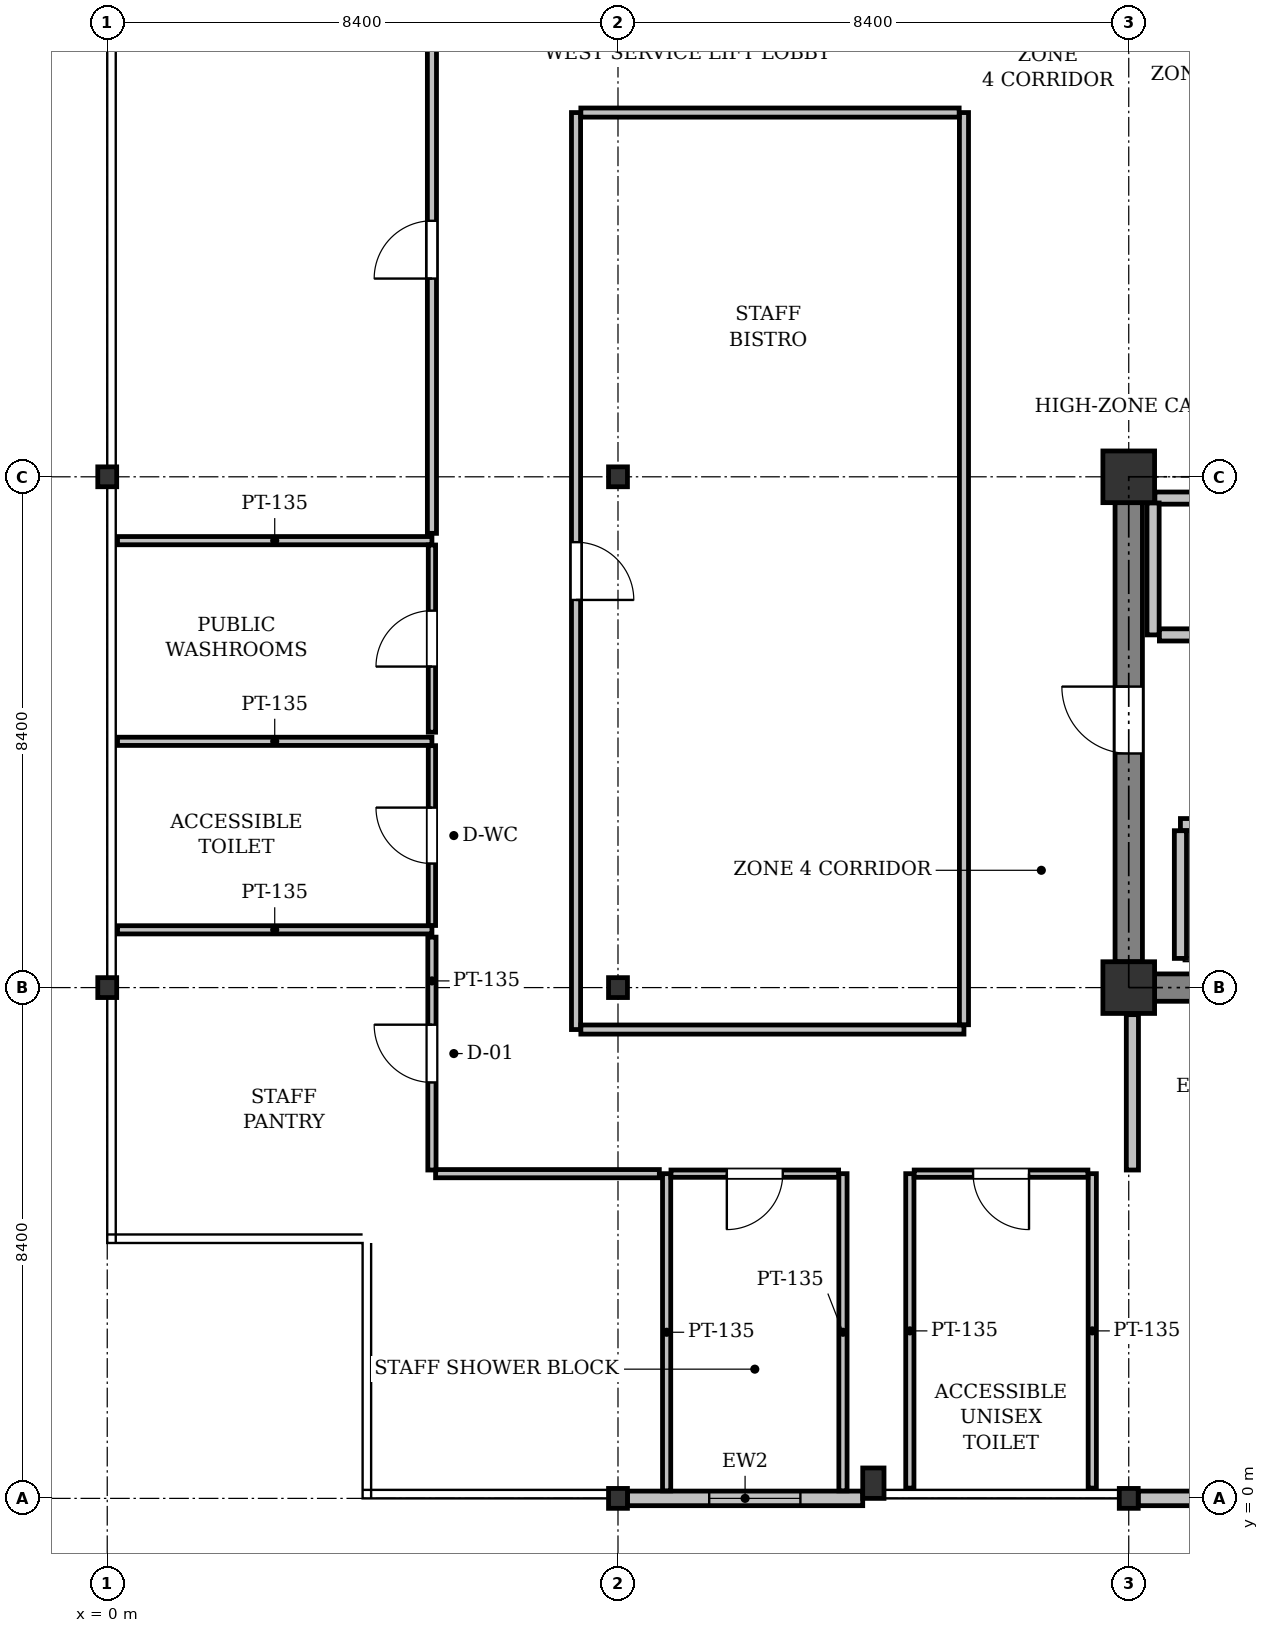
"""IFC4 building model, lengths in metres.
Left out: names, types, materials, properties, quantities, classifications, styles, units other than length and angle.
Written with IfcOpenShell. Run it as: python <this file> out.ifc"""

import sys

from ifc_helpers import new_model, si_unit, direction, frame, frame_2d, origin, origin_2d, place, context, subcontext, project, spatial, rectangle, i_section, extrude, element, fill, save


model = new_model("IFC4")
c1 = context("Model", 3, precision=1e-05, world=origin(), true_north=direction((0.0, 1.0)))
c2 = subcontext(c1, "Body", "Model", "MODEL_VIEW")
j1 = project(units=[si_unit("LENGTHUNIT", "METRE"), si_unit("PLANEANGLEUNIT", "RADIAN")], contexts=[c1])
p1 = place(None, origin())
s1 = spatial("IfcSite", under=j1, at=p1, CompositionType="ELEMENT")
p2 = place(p1, origin())
s2 = spatial("IfcBuilding", under=s1, at=p2, CompositionType="ELEMENT")
p3 = place(p2, frame((0.0, 0.0, 274.2)))
s3 = spatial("IfcBuildingStorey", under=s2, at=p3, CompositionType="ELEMENT", Elevation=274.2)
for number, where, z_axis, x_axis in (
    (1, (0.0, 8.4, 0.0), (0.0, 0.0, 1.0), (1.0, 0.0, 0.0)),
    (2, (0.0, 16.8, 0.0), (0.0, 0.0, 1.0), (1.0, 0.0, 0.0)),
    (3, (8.4, 0.0, 0.0), (0.0, 0.0, 1.0), (1.0, 0.0, 0.0)),
    (4, (8.4, 8.4, 0.0), (0.0, 0.0, 1.0), (1.0, 0.0, 0.0)),
    (5, (8.4, 16.8, 0.0), (0.0, 0.0, 1.0), (1.0, 0.0, 0.0)),
    (6, (16.8, 0.0, 0.0), (0.0, 0.0, 1.0), (1.0, 0.0, 0.0)),
):
    element("IfcColumn", number, at=place(p3, frame(where, z_axis=z_axis, x_axis=x_axis)), inside=s3, PredefinedType="COLUMN", context=c2, shape_type="SweptSolid", body=[
        extrude(i_section(OverallWidth=0.311, OverallDepth=0.327, WebThickness=0.016, FlangeThickness=0.025, FilletRadius=0.017, at=origin_2d()), origin(), (0.0, 0.0, 1.0), 4.0),
    ])
for number, where, z_axis, x_axis in (
    (7, (16.8, 8.4, 0.0), (0.0, 0.0, 1.0), (1.0, 0.0, 0.0)),
    (8, (16.8, 16.8, 0.0), (0.0, 0.0, 1.0), (1.0, 0.0, 0.0)),
):
    element("IfcColumn", number, at=place(p3, frame(where, z_axis=z_axis, x_axis=x_axis)), inside=s3, PredefinedType="COLUMN", context=c2, shape_type="SweptSolid", body=[
        extrude(rectangle(XDim=0.85, YDim=0.85, at=origin_2d()), origin(), (0.0, 0.0, 1.0), 4.0),
    ])
p4 = place(p3, frame((12.6, 0.25, 0.0), z_axis=(0.0, 0.0, 1.0), x_axis=(1.0, 0.0, 0.0)))
e9 = element("IfcColumn", 9, at=p4, inside=s3, PredefinedType="PILASTER", context=c2, shape_type="SweptSolid", body=[
    extrude(rectangle(XDim=0.35, YDim=0.5, at=origin_2d()), origin(), (0.0, 0.0, 1.0), 4.0),
])
p5 = place(p3, frame((20.825, 0.0, 0.0), z_axis=(0.0, 0.0, 1.0), x_axis=(-1.0, 0.0, 0.0)))
e10 = element("IfcWall", 10, at=p5, inside=s3, PredefinedType="STANDARD", context=c2, shape_type="SweptSolid", body=[
    extrude(rectangle(XDim=3.869, YDim=0.24, at=frame_2d((1.935, 0.0))), origin(), (0.0, 0.0, 1.0), 3.475),
])
p6 = place(p5, frame((1.185, 0.0, 0.9)))
e11 = element("IfcOpeningElement", 11, at=p6, cuts=e10, PredefinedType="OPENING", context=c2, shape_type="SweptSolid", body=[
    extrude(rectangle(XDim=1.5, YDim=1.6, at=frame_2d((0.75, 0.8))), frame((0.0, 0.13, 0.0), z_axis=(0.0, -1.0, 0.0), x_axis=(1.0, 0.0, 0.0)), (0.0, 0.0, 1.0), 0.26),
])
p7 = place(p3, frame((12.425, 0.0, 0.0), z_axis=(0.0, 0.0, 1.0), x_axis=(-1.0, 0.0, 0.0)))
e12 = element("IfcWall", 12, at=p7, inside=s3, PredefinedType="STANDARD", context=c2, shape_type="SweptSolid", body=[
    extrude(rectangle(XDim=3.87, YDim=0.24, at=frame_2d((1.935, 0.0))), origin(), (0.0, 0.0, 1.0), 3.475),
])
p8 = place(p7, frame((1.025, 0.0, 0.9)))
e13 = element("IfcOpeningElement", 13, at=p8, cuts=e12, PredefinedType="OPENING", context=c2, shape_type="SweptSolid", body=[
    extrude(rectangle(XDim=1.5, YDim=1.6, at=frame_2d((0.75, 0.8))), frame((0.0, 0.13, 0.0), z_axis=(0.0, -1.0, 0.0), x_axis=(1.0, 0.0, 0.0)), (0.0, 0.0, 1.0), 0.26),
])
p9 = place(p3, frame((17.225, 8.4, 0.0), z_axis=(0.0, 0.0, 1.0), x_axis=(1.0, 0.0, 0.0)))
e14 = element("IfcWall", 14, at=p9, inside=s3, PredefinedType="SHEAR", context=c2, shape_type="SweptSolid", body=[
    extrude(rectangle(XDim=7.55, YDim=0.45, at=frame_2d((3.775, 0.0))), origin(), (0.0, 0.0, 1.0), 3.725),
])
p10 = place(p3, frame((16.8, 8.825, 0.0), z_axis=(0.0, 0.0, 1.0), x_axis=(0.0, 1.0, 0.0)))
e15 = element("IfcWall", 15, at=p10, inside=s3, PredefinedType="SHEAR", context=c2, shape_type="SweptSolid", body=[
    extrude(rectangle(XDim=7.55, YDim=0.45, at=frame_2d((3.775, 0.0))), origin(), (0.0, 0.0, 1.0), 3.725),
])
p11 = place(p10, frame((3.425, 0.0, 0.0)))
e16 = element("IfcOpeningElement", 16, at=p11, cuts=e15, PredefinedType="OPENING", context=c2, shape_type="SweptSolid", body=[
    extrude(rectangle(XDim=1.1, YDim=2.15, at=frame_2d((0.55, 1.075))), frame((0.0, 0.235, 0.0), z_axis=(0.0, -1.0, 0.0), x_axis=(1.0, 0.0, 0.0)), (0.0, 0.0, 1.0), 0.47),
])
p12 = place(p3, frame((17.65, 11.08, 0.0), z_axis=(0.0, 0.0, 1.0), x_axis=(1.0, 0.0, 0.0)))
e17 = element("IfcWall", 17, at=p12, inside=s3, PredefinedType="PARTITIONING", context=c2, shape_type="SweptSolid", body=[
    extrude(rectangle(XDim=2.55, YDim=0.2, at=frame_2d((1.275, 0.0))), origin(), (0.0, 0.0, 1.0), 3.725),
])
p13 = place(p12, frame((0.725, 0.0, 0.0)))
e18 = element("IfcOpeningElement", 18, at=p13, cuts=e17, PredefinedType="OPENING", context=c2, shape_type="SweptSolid", body=[
    extrude(rectangle(XDim=1.1, YDim=2.2, at=frame_2d((0.55, 1.1))), frame((0.0, 0.11, 0.0), z_axis=(0.0, -1.0, 0.0), x_axis=(1.0, 0.0, 0.0)), (0.0, 0.0, 1.0), 0.22),
])
p14 = place(p3, frame((17.65, 8.88, 0.0), z_axis=(0.0, 0.0, 1.0), x_axis=(0.0, 1.0, 0.0)))
e19 = element("IfcWall", 19, at=p14, inside=s3, PredefinedType="PARTITIONING", context=c2, shape_type="SweptSolid", body=[
    extrude(rectangle(XDim=2.1, YDim=0.2, at=frame_2d((1.05, 0.0))), origin(), (0.0, 0.0, 1.0), 3.725),
])
p15 = place(p3, frame((21.446, 16.45, 0.0), z_axis=(0.0, 0.0, 1.0), x_axis=(-1.0, 0.0, 0.0)))
e20 = element("IfcWall", 20, at=p15, inside=s3, PredefinedType="PARTITIONING", context=c2, shape_type="SweptSolid", body=[
    extrude(rectangle(XDim=4.216, YDim=0.2, at=frame_2d((2.108, 0.0))), origin(), (0.0, 0.0, 1.0), 3.725),
])
p16 = place(p3, frame((17.2, 16.37, 0.0), z_axis=(0.0, 0.0, 1.0), x_axis=(0.0, -1.0, 0.0)))
e21 = element("IfcWall", 21, at=p16, inside=s3, PredefinedType="PARTITIONING", context=c2, shape_type="SweptSolid", body=[
    extrude(rectangle(XDim=2.17, YDim=0.2, at=frame_2d((1.085, 0.0))), origin(), (0.0, 0.0, 1.0), 3.725),
])
p17 = place(p3, frame((17.304, 14.2, 0.0), z_axis=(0.0, 0.0, 1.0), x_axis=(1.0, 0.0, 0.0)))
e22 = element("IfcWall", 22, at=p17, inside=s3, PredefinedType="PARTITIONING", context=c2, shape_type="SweptSolid", body=[
    extrude(rectangle(XDim=4.142, YDim=0.2, at=frame_2d((2.071, 0.0))), origin(), (0.0, 0.0, 1.0), 3.725),
])
p18 = place(p17, frame((1.646, 0.0, 0.0)))
e23 = element("IfcOpeningElement", 23, at=p18, cuts=e22, PredefinedType="OPENING", context=c2, shape_type="SweptSolid", body=[
    extrude(rectangle(XDim=0.85, YDim=2.15, at=frame_2d((0.425, 1.075))), frame((0.0, 0.11, 0.0), z_axis=(0.0, -1.0, 0.0), x_axis=(1.0, 0.0, 0.0)), (0.0, 0.0, 1.0), 0.22),
])
for number, where, z_axis, x_axis in (
    (24, (5.34, 12.45, 0.0), (0.0, 0.0, 1.0), (-1.0, 0.0, 0.0)),
    (25, (0.169, 9.35, 0.0), (0.0, 0.0, 1.0), (1.0, 0.0, 0.0)),
):
    element("IfcWall", number, at=place(p3, frame(where, z_axis=z_axis, x_axis=x_axis)), inside=s3, PredefinedType="PARTITIONING", context=c2, shape_type="SweptSolid", body=[
        extrude(rectangle(XDim=5.171, YDim=0.135, at=frame_2d((2.585, 0.0))), origin(), (0.0, 0.0, 1.0), 3.421),
    ])
p19 = place(p3, frame((5.34, 9.421, 0.0), z_axis=(0.0, 0.0, 1.0), x_axis=(0.0, 1.0, 0.0)))
e26 = element("IfcWall", 26, at=p19, inside=s3, PredefinedType="PARTITIONING", context=c2, shape_type="SweptSolid", body=[
    extrude(rectangle(XDim=2.957, YDim=0.12, at=frame_2d((1.479, 0.0))), origin(), (0.0, 0.0, 1.0), 3.725),
])
p20 = place(p19, frame((1.019, 0.0, 0.0)))
e27 = element("IfcOpeningElement", 27, at=p20, cuts=e26, PredefinedType="OPENING", context=c2, shape_type="SweptSolid", body=[
    extrude(rectangle(XDim=0.92, YDim=2.1, at=frame_2d((0.46, 1.05))), frame((0.0, 0.07, 0.0), z_axis=(0.0, -1.0, 0.0), x_axis=(1.0, 0.0, 0.0)), (0.0, 0.0, 1.0), 0.14),
])
p21 = place(p3, frame((5.34, 15.75, 0.0), z_axis=(0.0, 0.0, 1.0), x_axis=(-1.0, 0.0, 0.0)))
e28 = element("IfcWall", 28, at=p21, inside=s3, PredefinedType="PARTITIONING", context=c2, shape_type="SweptSolid", body=[
    extrude(rectangle(XDim=5.171, YDim=0.135, at=frame_2d((2.585, 0.0))), origin(), (0.0, 0.0, 1.0), 3.421),
])
p22 = place(p3, frame((5.34, 12.6, 0.0), z_axis=(0.0, 0.0, 1.0), x_axis=(0.0, 1.0, 0.0)))
e29 = element("IfcWall", 29, at=p22, inside=s3, PredefinedType="PARTITIONING", context=c2, shape_type="SweptSolid", body=[
    extrude(rectangle(XDim=3.078, YDim=0.12, at=frame_2d((1.539, 0.0))), origin(), (0.0, 0.0, 1.0), 3.725),
])
p23 = place(p22, frame((1.079, 0.0, 0.0)))
e30 = element("IfcOpeningElement", 30, at=p23, cuts=e29, PredefinedType="OPENING", context=c2, shape_type="SweptSolid", body=[
    extrude(rectangle(XDim=0.92, YDim=2.1, at=frame_2d((0.46, 1.05))), frame((0.0, 0.07, 0.0), z_axis=(0.0, -1.0, 0.0), x_axis=(1.0, 0.0, 0.0)), (0.0, 0.0, 1.0), 0.14),
])
for number, where, z_axis, x_axis in (
    (31, (9.2, 5.34, 0.0), (0.0, 0.0, 1.0), (0.0, -1.0, 0.0)),
    (32, (12.1, 0.124, 0.0), (0.0, 0.0, 1.0), (0.0, 1.0, 0.0)),
):
    element("IfcWall", number, at=place(p3, frame(where, z_axis=z_axis, x_axis=x_axis)), inside=s3, PredefinedType="PARTITIONING", context=c2, shape_type="SweptSolid", body=[
        extrude(rectangle(XDim=5.216, YDim=0.135, at=frame_2d((2.608, 0.0))), origin(), (0.0, 0.0, 1.0), 3.725),
    ])
p24 = place(p3, frame((12.029, 5.34, 0.0), z_axis=(0.0, 0.0, 1.0), x_axis=(-1.0, 0.0, 0.0)))
e33 = element("IfcWall", 33, at=p24, inside=s3, PredefinedType="PARTITIONING", context=c2, shape_type="SweptSolid", body=[
    extrude(rectangle(XDim=2.757, YDim=0.12, at=frame_2d((1.378, 0.0))), origin(), (0.0, 0.0, 1.0), 3.725),
])
p25 = place(p24, frame((0.918, 0.0, 0.0)))
e34 = element("IfcOpeningElement", 34, at=p25, cuts=e33, PredefinedType="OPENING", context=c2, shape_type="SweptSolid", body=[
    extrude(rectangle(XDim=0.92, YDim=2.1, at=frame_2d((0.46, 1.05))), frame((0.0, 0.07, 0.0), z_axis=(0.0, -1.0, 0.0), x_axis=(1.0, 0.0, 0.0)), (0.0, 0.0, 1.0), 0.14),
])
for number, where, z_axis, x_axis in (
    (35, (13.2, 5.34, 0.0), (0.0, 0.0, 1.0), (0.0, -1.0, 0.0)),
    (36, (16.2, 0.169, 0.0), (0.0, 0.0, 1.0), (0.0, 1.0, 0.0)),
):
    element("IfcWall", number, at=place(p3, frame(where, z_axis=z_axis, x_axis=x_axis)), inside=s3, PredefinedType="PARTITIONING", context=c2, shape_type="SweptSolid", body=[
        extrude(rectangle(XDim=5.171, YDim=0.135, at=frame_2d((2.585, 0.0))), origin(), (0.0, 0.0, 1.0), 3.725),
    ])
p26 = place(p3, frame((16.128, 5.34, 0.0), z_axis=(0.0, 0.0, 1.0), x_axis=(-1.0, 0.0, 0.0)))
e37 = element("IfcWall", 37, at=p26, inside=s3, PredefinedType="PARTITIONING", context=c2, shape_type="SweptSolid", body=[
    extrude(rectangle(XDim=2.857, YDim=0.12, at=frame_2d((1.428, 0.0))), origin(), (0.0, 0.0, 1.0), 3.725),
])
p27 = place(p26, frame((0.969, 0.0, 0.0)))
e38 = element("IfcOpeningElement", 38, at=p27, cuts=e37, PredefinedType="OPENING", context=c2, shape_type="SweptSolid", body=[
    extrude(rectangle(XDim=0.92, YDim=2.1, at=frame_2d((0.46, 1.05))), frame((0.0, 0.07, 0.0), z_axis=(0.0, -1.0, 0.0), x_axis=(1.0, 0.0, 0.0)), (0.0, 0.0, 1.0), 0.14),
])
p28 = place(p3, frame((9.08, 5.34, 0.0), z_axis=(0.0, 0.0, 1.0), x_axis=(-1.0, 0.0, 0.0)))
e39 = element("IfcWall", 39, at=p28, inside=s3, PredefinedType="PARTITIONING", context=c2, shape_type="SweptSolid", body=[
    extrude(rectangle(XDim=3.68, YDim=0.135, at=frame_2d((1.84, 0.0))), origin(), (0.0, 0.0, 1.0), 3.319),
])
p29 = place(p3, frame((5.34, 5.4, 0.0), z_axis=(0.0, 0.0, 1.0), x_axis=(0.0, 1.0, 0.0)))
e40 = element("IfcWall", 40, at=p29, inside=s3, PredefinedType="PARTITIONING", context=c2, shape_type="SweptSolid", body=[
    extrude(rectangle(XDim=3.83, YDim=0.135, at=frame_2d((1.915, 0.0))), origin(), (0.0, 0.0, 1.0), 3.271),
])
p30 = place(p29, frame((1.44, 0.0, 0.0)))
e41 = element("IfcOpeningElement", 41, at=p30, cuts=e40, PredefinedType="OPENING", context=c2, shape_type="SweptSolid", body=[
    extrude(rectangle(XDim=0.95, YDim=2.15, at=frame_2d((0.475, 1.075))), frame((0.0, 0.077, 0.0), z_axis=(0.0, -1.0, 0.0), x_axis=(1.0, 0.0, 0.0)), (0.0, 0.0, 1.0), 0.155),
])
p31 = place(p3, frame((7.71, 22.79, 0.0), z_axis=(0.0, 0.0, 1.0), x_axis=(0.0, -1.0, 0.0)))
e42 = element("IfcWall", 42, at=p31, inside=s3, PredefinedType="PARTITIONING", context=c2, shape_type="SweptSolid", body=[
    extrude(rectangle(XDim=15.08, YDim=0.15, at=frame_2d((7.54, 0.0))), origin(), (0.0, 0.0, 1.0), 3.271),
])
p32 = place(p31, frame((7.065, 0.0, 0.0)))
e43 = element("IfcOpeningElement", 43, at=p32, cuts=e42, PredefinedType="OPENING", context=c2, shape_type="SweptSolid", body=[
    extrude(rectangle(XDim=0.95, YDim=2.15, at=frame_2d((0.475, 1.075))), frame((0.0, 0.085, 0.0), z_axis=(0.0, -1.0, 0.0), x_axis=(1.0, 0.0, 0.0)), (0.0, 0.0, 1.0), 0.17),
])
p33 = place(p3, frame((7.789, 7.71, 0.0), z_axis=(0.0, 0.0, 1.0), x_axis=(1.0, 0.0, 0.0)))
e44 = element("IfcWall", 44, at=p33, inside=s3, PredefinedType="PARTITIONING", context=c2, shape_type="SweptSolid", body=[
    extrude(rectangle(XDim=6.301, YDim=0.15, at=frame_2d((3.15, 0.0))), origin(), (0.0, 0.0, 1.0), 3.319),
])
p34 = place(p3, frame((14.09, 7.789, 0.0), z_axis=(0.0, 0.0, 1.0), x_axis=(0.0, 1.0, 0.0)))
e45 = element("IfcWall", 45, at=p34, inside=s3, PredefinedType="PARTITIONING", context=c2, shape_type="SweptSolid", body=[
    extrude(rectangle(XDim=15.001, YDim=0.15, at=frame_2d((7.5, 0.0))), origin(), (0.0, 0.0, 1.0), 3.271),
])
p35 = place(p3, frame((14.011, 22.79, 0.0), z_axis=(0.0, 0.0, 1.0), x_axis=(-1.0, 0.0, 0.0)))
e46 = element("IfcWall", 46, at=p35, inside=s3, PredefinedType="PARTITIONING", context=c2, shape_type="SweptSolid", body=[
    extrude(rectangle(XDim=6.222, YDim=0.15, at=frame_2d((3.111, 0.0))), origin(), (0.0, 0.0, 1.0), 3.319),
])
p36 = place(p3, frame((5.34, 15.87, 0.0), z_axis=(0.0, 0.0, 1.0), x_axis=(0.0, 1.0, 0.0)))
e47 = element("IfcWall", 47, at=p36, inside=s3, PredefinedType="PARTITIONING", context=c2, shape_type="SweptSolid", body=[
    extrude(rectangle(XDim=9.33, YDim=0.15, at=frame_2d((4.665, 0.0))), origin(), (0.0, 0.0, 1.0), 3.271),
])
p37 = place(p36, frame((4.19, 0.0, 0.0)))
e48 = element("IfcOpeningElement", 48, at=p37, cuts=e47, PredefinedType="OPENING", context=c2, shape_type="SweptSolid", body=[
    extrude(rectangle(XDim=0.95, YDim=2.15, at=frame_2d((0.475, 1.075))), frame((0.0, 0.085, 0.0), z_axis=(0.0, -1.0, 0.0), x_axis=(1.0, 0.0, 0.0)), (0.0, 0.0, 1.0), 0.17),
])
p38 = place(p3, frame((16.86, 7.955, 0.0), z_axis=(0.0, 0.0, 1.0), x_axis=(0.0, -1.0, 0.0)))
e49 = element("IfcWall", 49, at=p38, inside=s3, PredefinedType="PARTITIONING", context=c2, shape_type="SweptSolid", body=[
    extrude(rectangle(XDim=2.555, YDim=0.2, at=frame_2d((1.278, 0.0))), origin(), (0.0, 0.0, 1.0), 3.319),
])
p39 = place(p8, origin())
e50 = element("IfcWindow", 50, at=p39, inside=s3, PartitioningType="SINGLE_PANEL", PredefinedType="WINDOW", context=c2, shape_type="SweptSolid", body=[
    extrude(rectangle(XDim=1.5, YDim=1.6, at=frame_2d((0.75, 0.8))), frame((0.0, 0.03, 0.0), z_axis=(0.0, -1.0, 0.0), x_axis=(1.0, 0.0, 0.0)), (0.0, 0.0, 1.0), 0.06),
])
fill(e13, e50)
p40 = place(p11, origin())
e51 = element("IfcDoor", 51, at=p40, inside=s3, OperationType="SINGLE_SWING_RIGHT", PredefinedType="DOOR", context=c2, shape_type="SweptSolid", body=[
    extrude(rectangle(XDim=1.1, YDim=2.15, at=frame_2d((0.55, 1.075))), frame((0.0, 0.025, 0.0), z_axis=(0.0, -1.0, 0.0), x_axis=(1.0, 0.0, 0.0)), (0.0, 0.0, 1.0), 0.05),
])
fill(e16, e51)
p41 = place(p20, origin())
e52 = element("IfcDoor", 52, at=p41, inside=s3, OperationType="SINGLE_SWING_RIGHT", PredefinedType="DOOR", context=c2, shape_type="SweptSolid", body=[
    extrude(rectangle(XDim=0.92, YDim=2.1, at=frame_2d((0.46, 1.05))), frame((0.0, 0.025, 0.0), z_axis=(0.0, -1.0, 0.0), x_axis=(1.0, 0.0, 0.0)), (0.0, 0.0, 1.0), 0.05),
])
fill(e27, e52)
p42 = place(p23, origin())
e53 = element("IfcDoor", 53, at=p42, inside=s3, OperationType="SINGLE_SWING_LEFT", PredefinedType="DOOR", context=c2, shape_type="SweptSolid", body=[
    extrude(rectangle(XDim=0.92, YDim=2.1, at=frame_2d((0.46, 1.05))), frame((0.0, 0.025, 0.0), z_axis=(0.0, -1.0, 0.0), x_axis=(1.0, 0.0, 0.0)), (0.0, 0.0, 1.0), 0.05),
])
fill(e30, e53)
p43 = place(p25, origin())
e54 = element("IfcDoor", 54, at=p43, inside=s3, OperationType="SINGLE_SWING_RIGHT", PredefinedType="DOOR", context=c2, shape_type="SweptSolid", body=[
    extrude(rectangle(XDim=0.92, YDim=2.1, at=frame_2d((0.46, 1.05))), frame((0.0, 0.025, 0.0), z_axis=(0.0, -1.0, 0.0), x_axis=(1.0, 0.0, 0.0)), (0.0, 0.0, 1.0), 0.05),
])
fill(e34, e54)
p44 = place(p27, origin())
e55 = element("IfcDoor", 55, at=p44, inside=s3, OperationType="SINGLE_SWING_LEFT", PredefinedType="DOOR", context=c2, shape_type="SweptSolid", body=[
    extrude(rectangle(XDim=0.92, YDim=2.1, at=frame_2d((0.46, 1.05))), frame((0.0, 0.025, 0.0), z_axis=(0.0, -1.0, 0.0), x_axis=(1.0, 0.0, 0.0)), (0.0, 0.0, 1.0), 0.05),
])
fill(e38, e55)
p45 = place(p30, origin())
e56 = element("IfcDoor", 56, at=p45, inside=s3, OperationType="SINGLE_SWING_RIGHT", PredefinedType="DOOR", context=c2, shape_type="SweptSolid", body=[
    extrude(rectangle(XDim=0.95, YDim=2.15, at=frame_2d((0.475, 1.075))), frame((0.0, 0.025, 0.0), z_axis=(0.0, -1.0, 0.0), x_axis=(1.0, 0.0, 0.0)), (0.0, 0.0, 1.0), 0.05),
])
fill(e41, e56)
p46 = place(p32, origin())
e57 = element("IfcDoor", 57, at=p46, inside=s3, OperationType="SINGLE_SWING_RIGHT", PredefinedType="DOOR", context=c2, shape_type="SweptSolid", body=[
    extrude(rectangle(XDim=0.95, YDim=2.15, at=frame_2d((0.475, 1.075))), frame((0.0, 0.025, 0.0), z_axis=(0.0, -1.0, 0.0), x_axis=(1.0, 0.0, 0.0)), (0.0, 0.0, 1.0), 0.05),
])
fill(e43, e57)
p47 = place(p37, origin())
e58 = element("IfcDoor", 58, at=p47, inside=s3, OperationType="SINGLE_SWING_LEFT", PredefinedType="DOOR", context=c2, shape_type="SweptSolid", body=[
    extrude(rectangle(XDim=0.95, YDim=2.15, at=frame_2d((0.475, 1.075))), frame((0.0, 0.025, 0.0), z_axis=(0.0, -1.0, 0.0), x_axis=(1.0, 0.0, 0.0)), (0.0, 0.0, 1.0), 0.05),
])
fill(e48, e58)
save(model, sys.argv[1])
